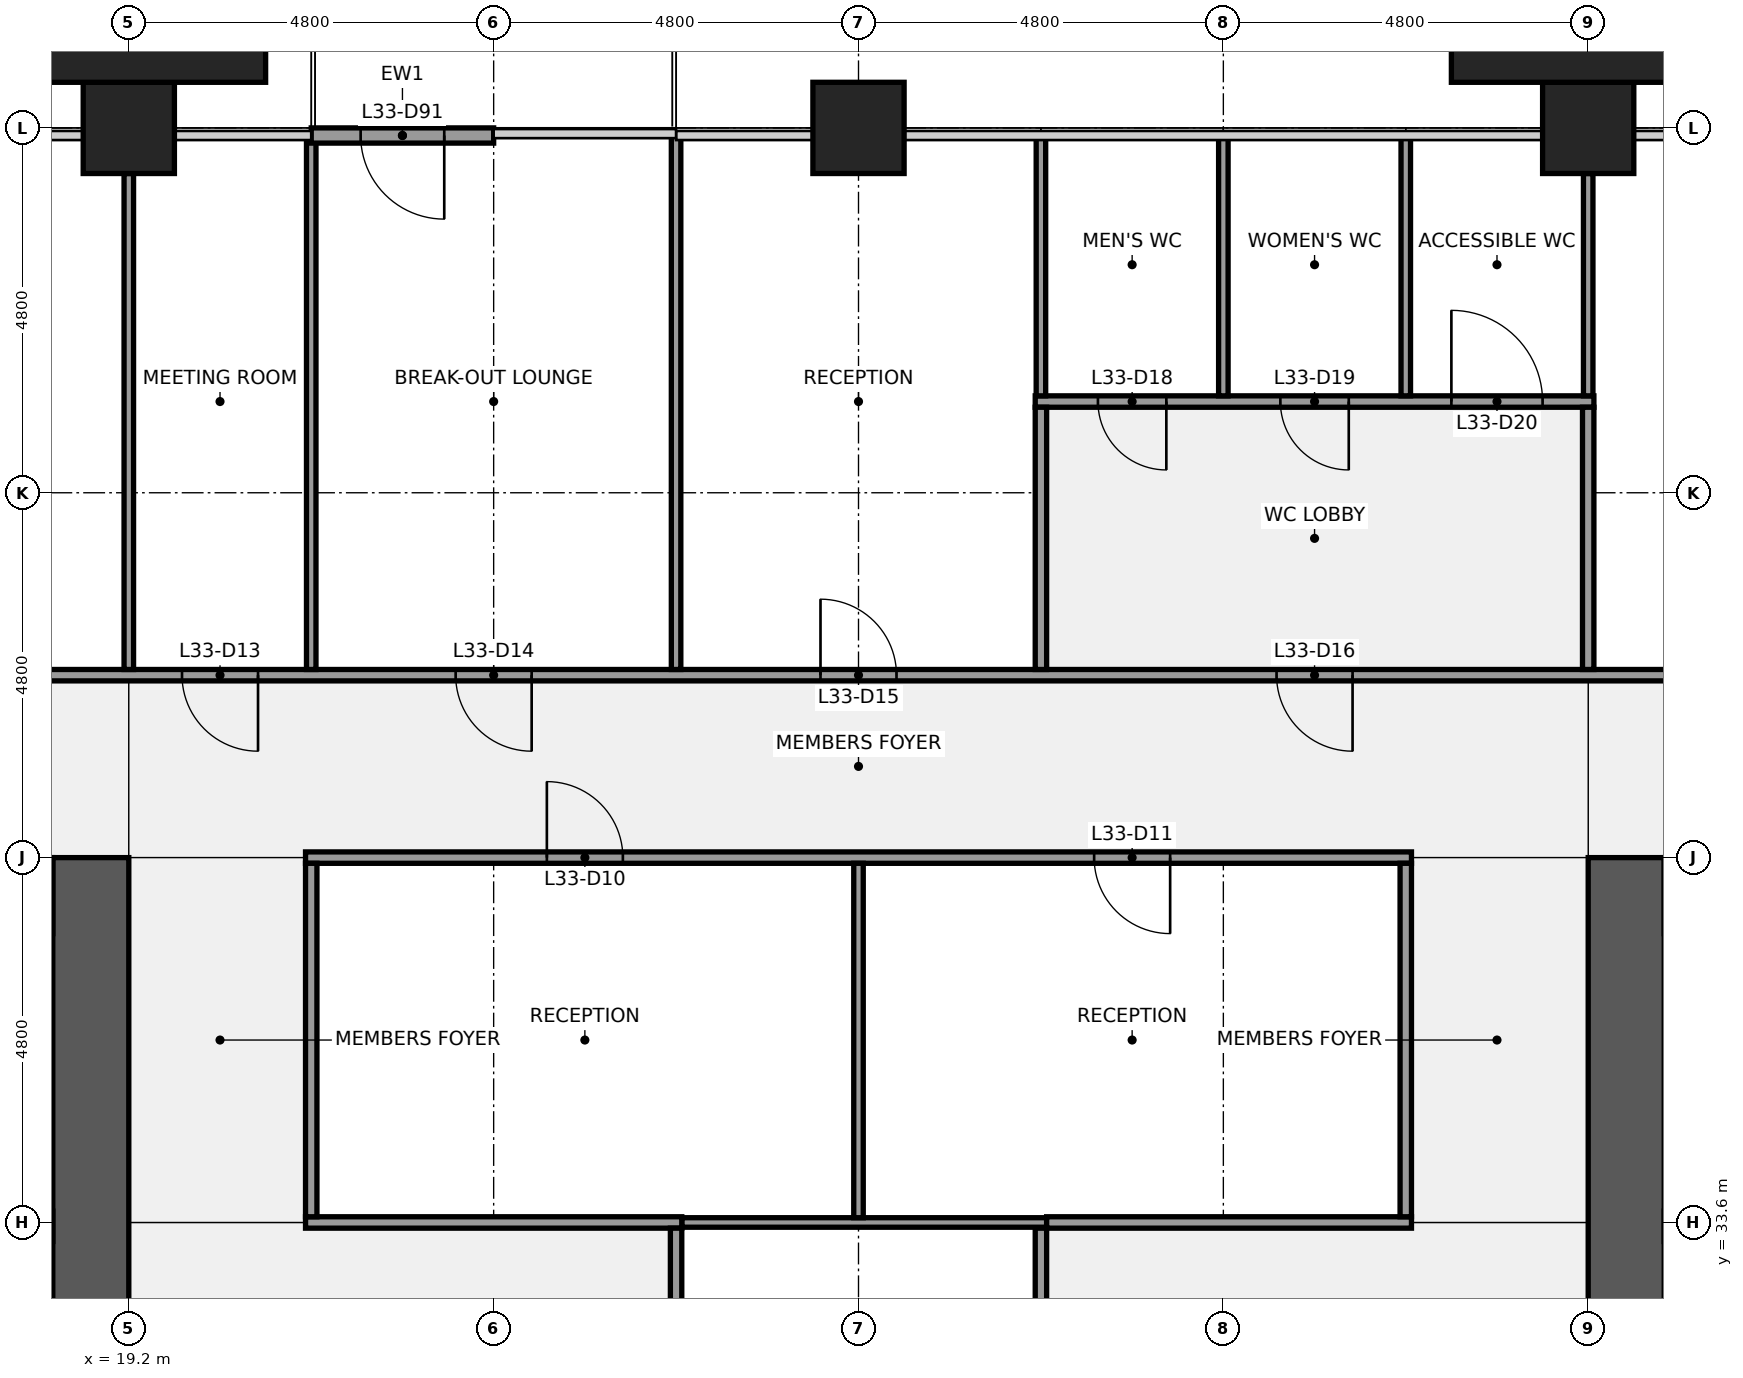
"""IFC4 building model, lengths in metres.
Left out: names, types, materials, properties, quantities, classifications, styles, units other than length and angle.
Written with IfcOpenShell. Run it as: python <this file> out.ifc"""

import sys

from ifc_helpers import new_model, si_unit, direction, frame, frame_2d, origin, origin_2d, place, context, subcontext, project, spatial, rectangle, extrude, element, fill, save


model = new_model("IFC4")
c1 = context("Model", 3, precision=1e-05, world=origin(), true_north=direction((0.0, 1.0)))
c2 = subcontext(c1, "Body", "Model", "MODEL_VIEW")
j1 = project(units=[si_unit("LENGTHUNIT", "METRE"), si_unit("PLANEANGLEUNIT", "RADIAN")], contexts=[c1])
p1 = place(None, origin())
s1 = spatial("IfcSite", under=j1, at=p1, CompositionType="ELEMENT")
p2 = place(p1, origin())
s2 = spatial("IfcBuilding", under=s1, at=p2, CompositionType="ELEMENT")
p3 = place(p2, frame((0.0, 0.0, 152.1)))
s3 = spatial("IfcBuildingStorey", under=s2, at=p3, CompositionType="ELEMENT", Elevation=152.1)
for number, where, z_axis, x_axis in (
    (1, (19.2, 48.0, 0.0), (0.0, 0.0, 1.0), (1.0, 0.0, 0.0)),
    (2, (28.8, 48.0, 0.0), (0.0, 0.0, 1.0), (1.0, 0.0, 0.0)),
    (3, (38.4, 48.0, 0.0), (0.0, 0.0, 1.0), (1.0, 0.0, 0.0)),
):
    element("IfcColumn", number, at=place(p3, frame(where, z_axis=z_axis, x_axis=x_axis)), inside=s3, PredefinedType="COLUMN", context=c2, shape_type="SweptSolid", body=[
        extrude(rectangle(XDim=1.2, YDim=1.2, at=origin_2d()), origin(), (0.0, 0.0, 1.0), 4.0),
    ])
p4 = place(p3, frame((18.7, 38.4, 0.0), z_axis=(0.0, 0.0, 1.0), x_axis=(0.0, -1.0, 0.0)))
e4 = element("IfcWall", 4, at=p4, inside=s3, PredefinedType="SHEAR", context=c2, shape_type="SweptSolid", body=[
    extrude(rectangle(XDim=28.8, YDim=1.0, at=frame_2d((14.4, 0.0))), origin(), (0.0, 0.0, 1.0), 3.84),
])
p5 = place(p4, frame((18.3, 0.0, 0.0)))
e5 = element("IfcOpeningElement", 5, at=p5, cuts=e4, PredefinedType="OPENING", context=c2, shape_type="SweptSolid", body=[
    extrude(rectangle(XDim=1.8, YDim=2.1, at=frame_2d((0.9, 1.05))), frame((0.0, 0.51, 0.0), z_axis=(0.0, -1.0, 0.0), x_axis=(1.0, 0.0, 0.0)), (0.0, 0.0, 1.0), 1.02),
])
p6 = place(p4, frame((8.7, 0.0, 0.0)))
e6 = element("IfcOpeningElement", 6, at=p6, cuts=e4, PredefinedType="OPENING", context=c2, shape_type="SweptSolid", body=[
    extrude(rectangle(XDim=1.8, YDim=2.1, at=frame_2d((0.9, 1.05))), frame((0.0, 0.51, 0.0), z_axis=(0.0, -1.0, 0.0), x_axis=(1.0, 0.0, 0.0)), (0.0, 0.0, 1.0), 1.02),
])
p7 = place(p3, frame((1.0, 33.55, 0.0), z_axis=(0.0, 0.0, 1.0), x_axis=(1.0, 0.0, 0.0)))
e7 = element("IfcWall", 7, at=p7, inside=s3, PredefinedType="SHEAR", context=c2, shape_type="SweptSolid", body=[
    extrude(rectangle(XDim=17.2, YDim=0.4, at=frame_2d((8.6, 0.0))), origin(), (0.0, 0.0, 1.0), 3.84),
])
p8 = place(p3, frame((38.9, 9.6, 0.0), z_axis=(0.0, 0.0, 1.0), x_axis=(0.0, 1.0, 0.0)))
e8 = element("IfcWall", 8, at=p8, inside=s3, PredefinedType="SHEAR", context=c2, shape_type="SweptSolid", body=[
    extrude(rectangle(XDim=28.8, YDim=1.0, at=frame_2d((14.4, 0.0))), origin(), (0.0, 0.0, 1.0), 3.84),
])
p9 = place(p8, frame((8.7, 0.0, 0.0)))
e9 = element("IfcOpeningElement", 9, at=p9, cuts=e8, PredefinedType="OPENING", context=c2, shape_type="SweptSolid", body=[
    extrude(rectangle(XDim=1.8, YDim=2.1, at=frame_2d((0.9, 1.05))), frame((0.0, 0.51, 0.0), z_axis=(0.0, -1.0, 0.0), x_axis=(1.0, 0.0, 0.0)), (0.0, 0.0, 1.0), 1.02),
])
p10 = place(p8, frame((18.3, 0.0, 0.0)))
e10 = element("IfcOpeningElement", 10, at=p10, cuts=e8, PredefinedType="OPENING", context=c2, shape_type="SweptSolid", body=[
    extrude(rectangle(XDim=1.8, YDim=2.1, at=frame_2d((0.9, 1.05))), frame((0.0, 0.51, 0.0), z_axis=(0.0, -1.0, 0.0), x_axis=(1.0, 0.0, 0.0)), (0.0, 0.0, 1.0), 1.02),
])
p11 = place(p3, frame((26.475, 33.6, 0.0), z_axis=(0.0, 0.0, 1.0), x_axis=(1.0, 0.0, 0.0)))
e11 = element("IfcWall", 11, at=p11, inside=s3, PredefinedType="PARTITIONING", context=c2, shape_type="SweptSolid", body=[
    extrude(rectangle(XDim=4.8, YDim=0.125, at=frame_2d((2.4, 0.0))), origin(), (0.0, 0.0, 1.0), 2.936),
])
p12 = place(p3, frame((21.525, 33.6, 0.0), z_axis=(0.0, 0.0, 1.0), x_axis=(1.0, 0.0, 0.0)))
e12 = element("IfcWall", 12, at=p12, inside=s3, PredefinedType="PARTITIONING", context=c2, shape_type="SweptSolid", body=[
    extrude(rectangle(XDim=4.95, YDim=0.15, at=frame_2d((2.475, 0.0))), origin(), (0.0, 0.0, 1.0), 2.936),
])
p13 = place(p3, frame((31.275, 33.6, 0.0), z_axis=(0.0, 0.0, 1.0), x_axis=(1.0, 0.0, 0.0)))
e13 = element("IfcWall", 13, at=p13, inside=s3, PredefinedType="PARTITIONING", context=c2, shape_type="SweptSolid", body=[
    extrude(rectangle(XDim=4.8, YDim=0.15, at=frame_2d((2.4, 0.0))), origin(), (0.0, 0.0, 1.0), 2.936),
])
p14 = place(p3, frame((21.525, 38.4, 0.0), z_axis=(0.0, 0.0, 1.0), x_axis=(1.0, 0.0, 0.0)))
e14 = element("IfcWall", 14, at=p14, inside=s3, PredefinedType="PARTITIONING", context=c2, shape_type="SweptSolid", body=[
    extrude(rectangle(XDim=14.55, YDim=0.15, at=frame_2d((7.275, 0.0))), origin(), (0.0, 0.0, 1.0), 2.936),
])
p15 = place(p14, frame((3.175, 0.0, 0.0)))
e15 = element("IfcOpeningElement", 15, at=p15, cuts=e14, PredefinedType="OPENING", context=c2, shape_type="SweptSolid", body=[
    extrude(rectangle(XDim=1.0, YDim=2.1, at=frame_2d((0.5, 1.05))), frame((0.0, 0.085, 0.0), z_axis=(0.0, -1.0, 0.0), x_axis=(1.0, 0.0, 0.0)), (0.0, 0.0, 1.0), 0.17),
])
p16 = place(p14, frame((10.375, 0.0, 0.0)))
e16 = element("IfcOpeningElement", 16, at=p16, cuts=e14, PredefinedType="OPENING", context=c2, shape_type="SweptSolid", body=[
    extrude(rectangle(XDim=1.0, YDim=2.1, at=frame_2d((0.5, 1.05))), frame((0.0, 0.085, 0.0), z_axis=(0.0, -1.0, 0.0), x_axis=(1.0, 0.0, 0.0)), (0.0, 0.0, 1.0), 0.17),
])
p17 = place(p3, frame((14.325, 40.8, 0.0), z_axis=(0.0, 0.0, 1.0), x_axis=(1.0, 0.0, 0.0)))
e17 = element("IfcWall", 17, at=p17, inside=s3, PredefinedType="PARTITIONING", context=c2, shape_type="SweptSolid", body=[
    extrude(rectangle(XDim=28.95, YDim=0.15, at=frame_2d((14.475, 0.0))), origin(), (0.0, 0.0, 1.0), 2.936),
])
p18 = place(p17, frame((1.975, 0.0, 0.0)))
e18 = element("IfcOpeningElement", 18, at=p18, cuts=e17, PredefinedType="OPENING", context=c2, shape_type="SweptSolid", body=[
    extrude(rectangle(XDim=1.0, YDim=2.1, at=frame_2d((0.5, 1.05))), frame((0.0, 0.085, 0.0), z_axis=(0.0, -1.0, 0.0), x_axis=(1.0, 0.0, 0.0)), (0.0, 0.0, 1.0), 0.17),
])
p19 = place(p17, frame((5.575, 0.0, 0.0)))
e19 = element("IfcOpeningElement", 19, at=p19, cuts=e17, PredefinedType="OPENING", context=c2, shape_type="SweptSolid", body=[
    extrude(rectangle(XDim=1.0, YDim=2.1, at=frame_2d((0.5, 1.05))), frame((0.0, 0.085, 0.0), z_axis=(0.0, -1.0, 0.0), x_axis=(1.0, 0.0, 0.0)), (0.0, 0.0, 1.0), 0.17),
])
p20 = place(p17, frame((9.175, 0.0, 0.0)))
e20 = element("IfcOpeningElement", 20, at=p20, cuts=e17, PredefinedType="OPENING", context=c2, shape_type="SweptSolid", body=[
    extrude(rectangle(XDim=1.0, YDim=2.1, at=frame_2d((0.5, 1.05))), frame((0.0, 0.085, 0.0), z_axis=(0.0, -1.0, 0.0), x_axis=(1.0, 0.0, 0.0)), (0.0, 0.0, 1.0), 0.17),
])
p21 = place(p17, frame((13.975, 0.0, 0.0)))
e21 = element("IfcOpeningElement", 21, at=p21, cuts=e17, PredefinedType="OPENING", context=c2, shape_type="SweptSolid", body=[
    extrude(rectangle(XDim=1.0, YDim=2.1, at=frame_2d((0.5, 1.05))), frame((0.0, 0.085, 0.0), z_axis=(0.0, -1.0, 0.0), x_axis=(1.0, 0.0, 0.0)), (0.0, 0.0, 1.0), 0.17),
])
p22 = place(p17, frame((19.975, 0.0, 0.0)))
e22 = element("IfcOpeningElement", 22, at=p22, cuts=e17, PredefinedType="OPENING", context=c2, shape_type="SweptSolid", body=[
    extrude(rectangle(XDim=1.0, YDim=2.1, at=frame_2d((0.5, 1.05))), frame((0.0, 0.085, 0.0), z_axis=(0.0, -1.0, 0.0), x_axis=(1.0, 0.0, 0.0)), (0.0, 0.0, 1.0), 0.17),
])
p23 = place(p17, frame((25.975, 0.0, 0.0)))
e23 = element("IfcOpeningElement", 23, at=p23, cuts=e17, PredefinedType="OPENING", context=c2, shape_type="SweptSolid", body=[
    extrude(rectangle(XDim=1.0, YDim=2.1, at=frame_2d((0.5, 1.05))), frame((0.0, 0.085, 0.0), z_axis=(0.0, -1.0, 0.0), x_axis=(1.0, 0.0, 0.0)), (0.0, 0.0, 1.0), 0.17),
])
p24 = place(p3, frame((31.125, 44.4, 0.0), z_axis=(0.0, 0.0, 1.0), x_axis=(1.0, 0.0, 0.0)))
e24 = element("IfcWall", 24, at=p24, inside=s3, PredefinedType="PARTITIONING", context=c2, shape_type="SweptSolid", body=[
    extrude(rectangle(XDim=7.35, YDim=0.15, at=frame_2d((3.675, 0.0))), origin(), (0.0, 0.0, 1.0), 2.936),
])
p25 = place(p24, frame((0.825, 0.0, 0.0)))
e25 = element("IfcOpeningElement", 25, at=p25, cuts=e24, PredefinedType="OPENING", context=c2, shape_type="SweptSolid", body=[
    extrude(rectangle(XDim=0.9, YDim=2.1, at=frame_2d((0.45, 1.05))), frame((0.0, 0.085, 0.0), z_axis=(0.0, -1.0, 0.0), x_axis=(1.0, 0.0, 0.0)), (0.0, 0.0, 1.0), 0.17),
])
p26 = place(p24, frame((3.225, 0.0, 0.0)))
e26 = element("IfcOpeningElement", 26, at=p26, cuts=e24, PredefinedType="OPENING", context=c2, shape_type="SweptSolid", body=[
    extrude(rectangle(XDim=0.9, YDim=2.1, at=frame_2d((0.45, 1.05))), frame((0.0, 0.085, 0.0), z_axis=(0.0, -1.0, 0.0), x_axis=(1.0, 0.0, 0.0)), (0.0, 0.0, 1.0), 0.17),
])
p27 = place(p24, frame((5.475, 0.0, 0.0)))
e27 = element("IfcOpeningElement", 27, at=p27, cuts=e24, PredefinedType="OPENING", context=c2, shape_type="SweptSolid", body=[
    extrude(rectangle(XDim=1.2, YDim=2.1, at=frame_2d((0.6, 1.05))), frame((0.0, 0.085, 0.0), z_axis=(0.0, -1.0, 0.0), x_axis=(1.0, 0.0, 0.0)), (0.0, 0.0, 1.0), 0.17),
])
p28 = place(p3, frame((19.2, 40.875, 0.0), z_axis=(0.0, 0.0, 1.0), x_axis=(0.0, 1.0, 0.0)))
e28 = element("IfcWall", 28, at=p28, inside=s3, PredefinedType="PARTITIONING", context=c2, shape_type="SweptSolid", body=[
    extrude(rectangle(XDim=6.525, YDim=0.125, at=frame_2d((3.262, 0.0))), origin(), (0.0, 0.0, 1.0), 2.936),
])
p29 = place(p3, frame((21.6, 40.875, 0.0), z_axis=(0.0, 0.0, 1.0), x_axis=(0.0, 1.0, 0.0)))
e29 = element("IfcWall", 29, at=p29, inside=s3, PredefinedType="PARTITIONING", context=c2, shape_type="SweptSolid", body=[
    extrude(rectangle(XDim=7.025, YDim=0.125, at=frame_2d((3.512, 0.0))), origin(), (0.0, 0.0, 1.0), 2.936),
])
p30 = place(p3, frame((21.6, 33.675, 0.0), z_axis=(0.0, 0.0, 1.0), x_axis=(0.0, 1.0, 0.0)))
e30 = element("IfcWall", 30, at=p30, inside=s3, PredefinedType="PARTITIONING", context=c2, shape_type="SweptSolid", body=[
    extrude(rectangle(XDim=4.65, YDim=0.15, at=frame_2d((2.325, 0.0))), origin(), (0.0, 0.0, 1.0), 2.936),
])
p31 = place(p3, frame((26.4, 40.875, 0.0), z_axis=(0.0, 0.0, 1.0), x_axis=(0.0, 1.0, 0.0)))
e31 = element("IfcWall", 31, at=p31, inside=s3, PredefinedType="PARTITIONING", context=c2, shape_type="SweptSolid", body=[
    extrude(rectangle(XDim=7.025, YDim=0.125, at=frame_2d((3.512, 0.0))), origin(), (0.0, 0.0, 1.0), 2.936),
])
p32 = place(p3, frame((26.4, 30.075, 0.0), z_axis=(0.0, 0.0, 1.0), x_axis=(0.0, 1.0, 0.0)))
e32 = element("IfcWall", 32, at=p32, inside=s3, PredefinedType="PARTITIONING", context=c2, shape_type="SweptSolid", body=[
    extrude(rectangle(XDim=3.45, YDim=0.15, at=frame_2d((1.725, 0.0))), origin(), (0.0, 0.0, 1.0), 2.936),
])
p33 = place(p3, frame((28.8, 33.663, 0.0), z_axis=(0.0, 0.0, 1.0), x_axis=(0.0, 1.0, 0.0)))
e33 = element("IfcWall", 33, at=p33, inside=s3, PredefinedType="PARTITIONING", context=c2, shape_type="SweptSolid", body=[
    extrude(rectangle(XDim=4.662, YDim=0.125, at=frame_2d((2.331, 0.0))), origin(), (0.0, 0.0, 1.0), 2.936),
])
p34 = place(p3, frame((31.2, 44.475, 0.0), z_axis=(0.0, 0.0, 1.0), x_axis=(0.0, 1.0, 0.0)))
e34 = element("IfcWall", 34, at=p34, inside=s3, PredefinedType="PARTITIONING", context=c2, shape_type="SweptSolid", body=[
    extrude(rectangle(XDim=3.425, YDim=0.125, at=frame_2d((1.712, 0.0))), origin(), (0.0, 0.0, 1.0), 2.936),
])
for number, where, z_axis, x_axis in (
    (35, (31.2, 30.075, 0.0), (0.0, 0.0, 1.0), (0.0, 1.0, 0.0)),
    (36, (31.2, 40.875, 0.0), (0.0, 0.0, 1.0), (0.0, 1.0, 0.0)),
):
    element("IfcWall", number, at=place(p3, frame(where, z_axis=z_axis, x_axis=x_axis)), inside=s3, PredefinedType="PARTITIONING", context=c2, shape_type="SweptSolid", body=[
        extrude(rectangle(XDim=3.45, YDim=0.15, at=frame_2d((1.725, 0.0))), origin(), (0.0, 0.0, 1.0), 2.936),
    ])
for number, where, z_axis, x_axis in (
    (37, (33.6, 44.475, 0.0), (0.0, 0.0, 1.0), (0.0, 1.0, 0.0)),
    (38, (36.0, 44.475, 0.0), (0.0, 0.0, 1.0), (0.0, 1.0, 0.0)),
):
    element("IfcWall", number, at=place(p3, frame(where, z_axis=z_axis, x_axis=x_axis)), inside=s3, PredefinedType="PARTITIONING", context=c2, shape_type="SweptSolid", body=[
        extrude(rectangle(XDim=3.425, YDim=0.125, at=frame_2d((1.712, 0.0))), origin(), (0.0, 0.0, 1.0), 2.936),
    ])
p35 = place(p3, frame((36.0, 33.675, 0.0), z_axis=(0.0, 0.0, 1.0), x_axis=(0.0, 1.0, 0.0)))
e39 = element("IfcWall", 39, at=p35, inside=s3, PredefinedType="PARTITIONING", context=c2, shape_type="SweptSolid", body=[
    extrude(rectangle(XDim=4.65, YDim=0.15, at=frame_2d((2.325, 0.0))), origin(), (0.0, 0.0, 1.0), 2.936),
])
p36 = place(p3, frame((38.4, 44.475, 0.0), z_axis=(0.0, 0.0, 1.0), x_axis=(0.0, 1.0, 0.0)))
e40 = element("IfcWall", 40, at=p36, inside=s3, PredefinedType="PARTITIONING", context=c2, shape_type="SweptSolid", body=[
    extrude(rectangle(XDim=2.925, YDim=0.125, at=frame_2d((1.462, 0.0))), origin(), (0.0, 0.0, 1.0), 2.936),
])
p37 = place(p3, frame((38.4, 40.875, 0.0), z_axis=(0.0, 0.0, 1.0), x_axis=(0.0, 1.0, 0.0)))
e41 = element("IfcWall", 41, at=p37, inside=s3, PredefinedType="PARTITIONING", context=c2, shape_type="SweptSolid", body=[
    extrude(rectangle(XDim=3.45, YDim=0.15, at=frame_2d((1.725, 0.0))), origin(), (0.0, 0.0, 1.0), 2.936),
])
p38 = place(p3, frame((24.0, 47.9, 0.0), z_axis=(0.0, 0.0, 1.0), x_axis=(-1.0, 0.0, 0.0)))
e42 = element("IfcWall", 42, at=p38, inside=s3, PredefinedType="SOLIDWALL", context=c2, shape_type="SweptSolid", body=[
    extrude(rectangle(XDim=2.4, YDim=0.2, at=frame_2d((1.2, 0.0))), origin(), (0.0, 0.0, 1.0), 3.314),
])
p39 = place(p38, frame((0.65, 0.0, 0.0)))
e43 = element("IfcOpeningElement", 43, at=p39, cuts=e42, PredefinedType="OPENING", context=c2, shape_type="SweptSolid", body=[
    extrude(rectangle(XDim=1.1, YDim=2.1, at=frame_2d((0.55, 1.05))), frame((0.0, 0.11, 0.0), z_axis=(0.0, -1.0, 0.0), x_axis=(1.0, 0.0, 0.0)), (0.0, 0.0, 1.0), 0.22),
])
for number, where, z_axis, x_axis in (
    (44, (19.2, 49.05, 0.0), (0.0, 0.0, 1.0), (1.0, 0.0, 0.0)),
    (45, (38.4, 49.05, 0.0), (0.0, 0.0, 1.0), (1.0, 0.0, 0.0)),
):
    element("IfcColumn", number, at=place(p3, frame(where, z_axis=z_axis, x_axis=x_axis)), inside=s3, PredefinedType="PILASTER", context=c2, shape_type="SweptSolid", body=[
        extrude(rectangle(XDim=3.6, YDim=0.9, at=origin_2d()), origin(), (0.0, 0.0, 1.0), 4.0),
    ])
p40 = place(p15, origin())
e46 = element("IfcDoor", 46, at=p40, inside=s3, OperationType="SINGLE_SWING_LEFT", PredefinedType="DOOR", context=c2, shape_type="SweptSolid", body=[
    extrude(rectangle(XDim=1.0, YDim=2.1, at=frame_2d((0.5, 1.05))), frame((0.0, 0.025, 0.0), z_axis=(0.0, -1.0, 0.0), x_axis=(1.0, 0.0, 0.0)), (0.0, 0.0, 1.0), 0.05),
])
fill(e15, e46)
p41 = place(p16, origin())
e47 = element("IfcDoor", 47, at=p41, inside=s3, OperationType="SINGLE_SWING_RIGHT", PredefinedType="DOOR", context=c2, shape_type="SweptSolid", body=[
    extrude(rectangle(XDim=1.0, YDim=2.1, at=frame_2d((0.5, 1.05))), frame((0.0, 0.025, 0.0), z_axis=(0.0, -1.0, 0.0), x_axis=(1.0, 0.0, 0.0)), (0.0, 0.0, 1.0), 0.05),
])
fill(e16, e47)
p42 = place(p19, origin())
e48 = element("IfcDoor", 48, at=p42, inside=s3, OperationType="SINGLE_SWING_RIGHT", PredefinedType="DOOR", context=c2, shape_type="SweptSolid", body=[
    extrude(rectangle(XDim=1.0, YDim=2.1, at=frame_2d((0.5, 1.05))), frame((0.0, 0.025, 0.0), z_axis=(0.0, -1.0, 0.0), x_axis=(1.0, 0.0, 0.0)), (0.0, 0.0, 1.0), 0.05),
])
fill(e19, e48)
p43 = place(p20, origin())
e49 = element("IfcDoor", 49, at=p43, inside=s3, OperationType="SINGLE_SWING_RIGHT", PredefinedType="DOOR", context=c2, shape_type="SweptSolid", body=[
    extrude(rectangle(XDim=1.0, YDim=2.1, at=frame_2d((0.5, 1.05))), frame((0.0, 0.025, 0.0), z_axis=(0.0, -1.0, 0.0), x_axis=(1.0, 0.0, 0.0)), (0.0, 0.0, 1.0), 0.05),
])
fill(e20, e49)
p44 = place(p21, origin())
e50 = element("IfcDoor", 50, at=p44, inside=s3, OperationType="SINGLE_SWING_LEFT", PredefinedType="DOOR", context=c2, shape_type="SweptSolid", body=[
    extrude(rectangle(XDim=1.0, YDim=2.1, at=frame_2d((0.5, 1.05))), frame((0.0, 0.025, 0.0), z_axis=(0.0, -1.0, 0.0), x_axis=(1.0, 0.0, 0.0)), (0.0, 0.0, 1.0), 0.05),
])
fill(e21, e50)
p45 = place(p22, origin())
e51 = element("IfcDoor", 51, at=p45, inside=s3, OperationType="SINGLE_SWING_RIGHT", PredefinedType="DOOR", context=c2, shape_type="SweptSolid", body=[
    extrude(rectangle(XDim=1.0, YDim=2.1, at=frame_2d((0.5, 1.05))), frame((0.0, 0.025, 0.0), z_axis=(0.0, -1.0, 0.0), x_axis=(1.0, 0.0, 0.0)), (0.0, 0.0, 1.0), 0.05),
])
fill(e22, e51)
p46 = place(p25, origin())
e52 = element("IfcDoor", 52, at=p46, inside=s3, OperationType="SINGLE_SWING_RIGHT", PredefinedType="DOOR", context=c2, shape_type="SweptSolid", body=[
    extrude(rectangle(XDim=0.9, YDim=2.1, at=frame_2d((0.45, 1.05))), frame((0.0, 0.025, 0.0), z_axis=(0.0, -1.0, 0.0), x_axis=(1.0, 0.0, 0.0)), (0.0, 0.0, 1.0), 0.05),
])
fill(e25, e52)
p47 = place(p26, origin())
e53 = element("IfcDoor", 53, at=p47, inside=s3, OperationType="SINGLE_SWING_RIGHT", PredefinedType="DOOR", context=c2, shape_type="SweptSolid", body=[
    extrude(rectangle(XDim=0.9, YDim=2.1, at=frame_2d((0.45, 1.05))), frame((0.0, 0.025, 0.0), z_axis=(0.0, -1.0, 0.0), x_axis=(1.0, 0.0, 0.0)), (0.0, 0.0, 1.0), 0.05),
])
fill(e26, e53)
p48 = place(p27, origin())
e54 = element("IfcDoor", 54, at=p48, inside=s3, OperationType="SINGLE_SWING_LEFT", PredefinedType="DOOR", context=c2, shape_type="SweptSolid", body=[
    extrude(rectangle(XDim=1.2, YDim=2.1, at=frame_2d((0.6, 1.05))), frame((0.0, 0.025, 0.0), z_axis=(0.0, -1.0, 0.0), x_axis=(1.0, 0.0, 0.0)), (0.0, 0.0, 1.0), 0.05),
])
fill(e27, e54)
p49 = place(p39, origin())
e55 = element("IfcDoor", 55, at=p49, inside=s3, OperationType="SINGLE_SWING_LEFT", PredefinedType="DOOR", context=c2, shape_type="SweptSolid", body=[
    extrude(rectangle(XDim=1.1, YDim=2.1, at=frame_2d((0.55, 1.05))), frame((0.0, 0.025, 0.0), z_axis=(0.0, -1.0, 0.0), x_axis=(1.0, 0.0, 0.0)), (0.0, 0.0, 1.0), 0.05),
])
fill(e43, e55)
save(model, sys.argv[1])
